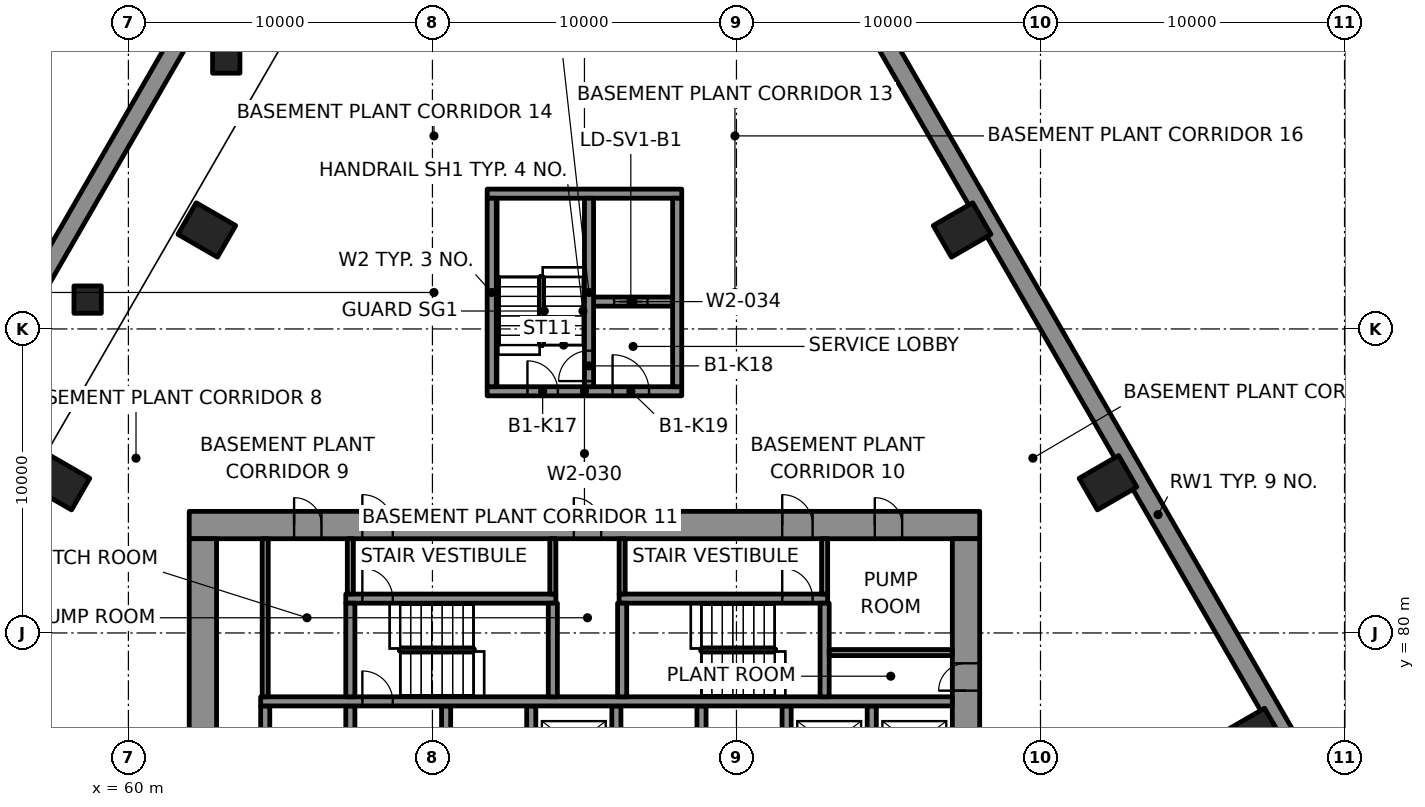
"""IFC4 building model, lengths in metres.
Left out: names, types, materials, properties, quantities, classifications, styles, units other than length and angle.
Written with IfcOpenShell. Run it as: python <this file> out.ifc"""

import sys

from ifc_helpers import new_model, si_unit, direction, frame, frame_2d, origin, origin_2d, place, context, subcontext, project, spatial, rectangle, extrude, element, fill, save


model = new_model("IFC4")
c1 = context("Model", 3, precision=1e-05, world=origin(), true_north=direction((0.0, 1.0)))
c2 = subcontext(c1, "Body", "Model", "MODEL_VIEW")
j1 = project(units=[si_unit("LENGTHUNIT", "METRE"), si_unit("PLANEANGLEUNIT", "RADIAN")], contexts=[c1])
p1 = place(None, origin())
s1 = spatial("IfcSite", under=j1, at=p1, CompositionType="ELEMENT")
p2 = place(p1, origin())
s2 = spatial("IfcBuilding", under=s1, at=p2, CompositionType="ELEMENT")
p3 = place(p2, frame((0.0, 0.0, -5.0)))
s3 = spatial("IfcBuildingStorey", under=s2, at=p3, CompositionType="ELEMENT", Elevation=-5.0)
p4 = place(p3, frame((109.132, 57.451, -0.35), z_axis=(0.0, 0.0, 1.0), x_axis=(-0.499999206999, 0.866025861623, 0.0)))
e1 = element("IfcWall", 1, at=p4, inside=s3, PredefinedType="SOLIDWALL", context=c2, shape_type="SweptSolid", body=[
    extrude(rectangle(XDim=61.064, YDim=0.6, at=frame_2d((30.532, 0.0))), origin(), (0.0, 0.0, 1.0), 5.05),
])
p5 = place(p3, frame((67.936, 110.334, -0.35), z_axis=(0.0, 0.0, 1.0), x_axis=(-0.499999089162, -0.866025929656, 0.0)))
e2 = element("IfcWall", 2, at=p5, inside=s3, PredefinedType="SOLIDWALL", context=c2, shape_type="SweptSolid", body=[
    extrude(rectangle(XDim=53.501, YDim=0.6, at=frame_2d((26.751, 0.0))), origin(), (0.0, 0.0, 1.0), 5.05),
])
for number, where, z_axis, x_axis in (
    (3, (97.021, 76.628, 0.0), (0.0, 0.0, 1.0), (-0.5, 0.866, 0.0)),
    (4, (92.22, 84.942, 0.0), (0.0, 0.0, 1.0), (-0.5, 0.866, 0.0)),
    (5, (87.421, 93.256, 0.0), (0.0, 0.0, 1.0), (-0.5, 0.866, 0.0)),
    (6, (62.579, 93.256, 0.0), (0.0, 0.0, 1.0), (-0.5, -0.866, 0.0)),
    (7, (57.78, 84.942, 0.0), (0.0, 0.0, 1.0), (-0.5, -0.866, 0.0)),
):
    element("IfcColumn", number, at=place(p3, frame(where, z_axis=z_axis, x_axis=x_axis)), inside=s3, PredefinedType="COLUMN", context=c2, shape_type="SweptSolid", body=[
        extrude(rectangle(XDim=1.2, YDim=1.5, at=origin_2d()), origin(), (0.0, 0.0, 1.0), 5.0),
    ])
for number, where, z_axis, x_axis in (
    (8, (58.659, 90.966, 0.0), (0.0, 0.0, 1.0), (1.0, 0.0, 0.0)),
    (9, (63.219, 98.863, 0.0), (0.0, 0.0, 1.0), (1.0, 0.0, 0.0)),
):
    element("IfcColumn", number, at=place(p3, frame(where, z_axis=z_axis, x_axis=x_axis)), inside=s3, PredefinedType="COLUMN", context=c2, shape_type="SweptSolid", body=[
        extrude(rectangle(XDim=0.9, YDim=0.9, at=origin_2d()), origin(), (0.0, 0.0, 1.0), 4.55),
    ])
p6 = place(p3, frame((62.0, 83.55, 0.0), z_axis=(0.0, 0.0, 1.0), x_axis=(1.0, 0.0, 0.0)))
e10 = element("IfcWall", 10, at=p6, inside=s3, PredefinedType="SHEAR", context=c2, shape_type="SweptSolid", body=[
    extrude(rectangle(XDim=26.0, YDim=0.9, at=frame_2d((13.0, 0.0))), origin(), (0.0, 0.0, 1.0), 4.7),
])
p7 = place(p6, frame((5.695, 0.0, 0.0)))
e11 = element("IfcOpeningElement", 11, at=p7, cuts=e10, PredefinedType="OPENING", context=c2, shape_type="SweptSolid", body=[
    extrude(rectangle(XDim=1.0, YDim=2.1, at=frame_2d((0.5, 1.05))), frame((0.0, 0.46, 0.0), z_axis=(0.0, -1.0, 0.0), x_axis=(1.0, 0.0, 0.0)), (0.0, 0.0, 1.0), 0.92),
])
p8 = place(p6, frame((19.505, 0.0, 0.0)))
e12 = element("IfcOpeningElement", 12, at=p8, cuts=e10, PredefinedType="OPENING", context=c2, shape_type="SweptSolid", body=[
    extrude(rectangle(XDim=1.0, YDim=2.1, at=frame_2d((0.5, 1.05))), frame((0.0, 0.46, 0.0), z_axis=(0.0, -1.0, 0.0), x_axis=(1.0, 0.0, 0.0)), (0.0, 0.0, 1.0), 0.92),
])
p9 = place(p6, frame((3.45, 0.0, 0.0)))
e13 = element("IfcOpeningElement", 13, at=p9, cuts=e10, PredefinedType="OPENING", context=c2, shape_type="SweptSolid", body=[
    extrude(rectangle(XDim=0.9, YDim=2.1, at=frame_2d((0.45, 1.05))), frame((0.0, 0.46, 0.0), z_axis=(0.0, -1.0, 0.0), x_axis=(1.0, 0.0, 0.0)), (0.0, 0.0, 1.0), 0.92),
])
p10 = place(p6, frame((12.65, 0.0, 0.0)))
e14 = element("IfcOpeningElement", 14, at=p10, cuts=e10, PredefinedType="OPENING", context=c2, shape_type="SweptSolid", body=[
    extrude(rectangle(XDim=0.9, YDim=2.1, at=frame_2d((0.45, 1.05))), frame((0.0, 0.46, 0.0), z_axis=(0.0, -1.0, 0.0), x_axis=(1.0, 0.0, 0.0)), (0.0, 0.0, 1.0), 0.92),
])
p11 = place(p6, frame((22.55, 0.0, 0.0)))
e15 = element("IfcOpeningElement", 15, at=p11, cuts=e10, PredefinedType="OPENING", context=c2, shape_type="SweptSolid", body=[
    extrude(rectangle(XDim=0.9, YDim=2.1, at=frame_2d((0.45, 1.05))), frame((0.0, 0.46, 0.0), z_axis=(0.0, -1.0, 0.0), x_axis=(1.0, 0.0, 0.0)), (0.0, 0.0, 1.0), 0.92),
])
p12 = place(p3, frame((62.45, 66.9, 0.0), z_axis=(0.0, 0.0, 1.0), x_axis=(0.0, 1.0, 0.0)))
e16 = element("IfcWall", 16, at=p12, inside=s3, PredefinedType="SHEAR", context=c2, shape_type="SweptSolid", body=[
    extrude(rectangle(XDim=16.2, YDim=0.9, at=frame_2d((8.1, 0.0))), origin(), (0.0, 0.0, 1.0), 4.7),
])
p13 = place(p12, frame((5.5, 0.0, 0.0)))
e17 = element("IfcOpeningElement", 17, at=p13, cuts=e16, PredefinedType="OPENING", context=c2, shape_type="SweptSolid", body=[
    extrude(rectangle(XDim=1.8, YDim=2.1, at=frame_2d((0.9, 1.05))), frame((0.0, 0.46, 0.0), z_axis=(0.0, -1.0, 0.0), x_axis=(1.0, 0.0, 0.0)), (0.0, 0.0, 1.0), 0.92),
])
p14 = place(p3, frame((87.55, 66.9, 0.0), z_axis=(0.0, 0.0, 1.0), x_axis=(0.0, 1.0, 0.0)))
e18 = element("IfcWall", 18, at=p14, inside=s3, PredefinedType="SHEAR", context=c2, shape_type="SweptSolid", body=[
    extrude(rectangle(XDim=16.2, YDim=0.9, at=frame_2d((8.1, 0.0))), origin(), (0.0, 0.0, 1.0), 4.7),
])
p15 = place(p14, frame((5.5, 0.0, 0.0)))
e19 = element("IfcOpeningElement", 19, at=p15, cuts=e18, PredefinedType="OPENING", context=c2, shape_type="SweptSolid", body=[
    extrude(rectangle(XDim=1.8, YDim=2.1, at=frame_2d((0.9, 1.05))), frame((0.0, 0.46, 0.0), z_axis=(0.0, -1.0, 0.0), x_axis=(1.0, 0.0, 0.0)), (0.0, 0.0, 1.0), 0.92),
])
p16 = place(p14, frame((11.202, 0.0, 0.0)))
e20 = element("IfcOpeningElement", 20, at=p16, cuts=e18, PredefinedType="OPENING", context=c2, shape_type="SweptSolid", body=[
    extrude(rectangle(XDim=0.9, YDim=2.1, at=frame_2d((0.45, 1.05))), frame((0.0, 0.46, 0.0), z_axis=(0.0, -1.0, 0.0), x_axis=(1.0, 0.0, 0.0)), (0.0, 0.0, 1.0), 0.92),
])
for number, where, z_axis, x_axis in (
    (21, (64.5, 75.0, 0.0), (0.0, 0.0, 1.0), (0.0, 1.0, 0.0)),
    (22, (67.3, 75.0, 0.0), (0.0, 0.0, 1.0), (0.0, 1.0, 0.0)),
):
    element("IfcWall", number, at=place(p3, frame(where, z_axis=z_axis, x_axis=x_axis)), inside=s3, PredefinedType="SHEAR", context=c2, shape_type="SweptSolid", body=[
        extrude(rectangle(XDim=2.6, YDim=0.3, at=frame_2d((1.3, 0.0))), origin(), (0.0, 0.0, 1.0), 4.7),
    ])
p17 = place(p3, frame((70.45, 75.0, 0.0), z_axis=(0.0, 0.0, 1.0), x_axis=(0.0, 1.0, 0.0)))
e23 = element("IfcWall", 23, at=p17, inside=s3, PredefinedType="SHEAR", context=c2, shape_type="SweptSolid", body=[
    extrude(rectangle(XDim=2.6, YDim=0.3, at=frame_2d((1.3, 0.0))), origin(), (0.0, 0.0, 1.0), 4.7),
])
p18 = place(p17, frame((0.15, 0.0, 0.0)))
e24 = element("IfcOpeningElement", 24, at=p18, cuts=e23, PredefinedType="OPENING", context=c2, shape_type="SweptSolid", body=[
    extrude(rectangle(XDim=1.1, YDim=2.1, at=frame_2d((0.55, 1.05))), frame((0.0, 0.16, 0.0), z_axis=(0.0, -1.0, 0.0), x_axis=(1.0, 0.0, 0.0)), (0.0, 0.0, 1.0), 0.32),
])
for number, where, z_axis, x_axis in (
    (25, (73.25, 75.0, 0.0), (0.0, 0.0, 1.0), (0.0, 1.0, 0.0)),
    (26, (76.05, 75.0, 0.0), (0.0, 0.0, 1.0), (0.0, 1.0, 0.0)),
    (27, (78.85, 75.0, 0.0), (0.0, 0.0, 1.0), (0.0, 1.0, 0.0)),
    (28, (81.65, 75.0, 0.0), (0.0, 0.0, 1.0), (0.0, 1.0, 0.0)),
    (29, (84.45, 75.0, 0.0), (0.0, 0.0, 1.0), (0.0, 1.0, 0.0)),
):
    element("IfcWall", number, at=place(p3, frame(where, z_axis=z_axis, x_axis=x_axis)), inside=s3, PredefinedType="SHEAR", context=c2, shape_type="SweptSolid", body=[
        extrude(rectangle(XDim=2.6, YDim=0.3, at=frame_2d((1.3, 0.0))), origin(), (0.0, 0.0, 1.0), 4.7),
    ])
p19 = place(p3, frame((64.35, 77.75, 0.0), z_axis=(0.0, 0.0, 1.0), x_axis=(1.0, 0.0, 0.0)))
e30 = element("IfcWall", 30, at=p19, inside=s3, PredefinedType="SHEAR", context=c2, shape_type="SweptSolid", body=[
    extrude(rectangle(XDim=22.75, YDim=0.3, at=frame_2d((11.375, 0.0))), origin(), (0.0, 0.0, 1.0), 4.7),
])
p20 = place(p19, frame((3.345, 0.0, 0.0)))
e31 = element("IfcOpeningElement", 31, at=p20, cuts=e30, PredefinedType="OPENING", context=c2, shape_type="SweptSolid", body=[
    extrude(rectangle(XDim=1.0, YDim=2.1, at=frame_2d((0.5, 1.05))), frame((0.0, 0.16, 0.0), z_axis=(0.0, -1.0, 0.0), x_axis=(1.0, 0.0, 0.0)), (0.0, 0.0, 1.0), 0.32),
])
p21 = place(p3, frame((67.15, 81.13, 0.0), z_axis=(0.0, 0.0, 1.0), x_axis=(1.0, 0.0, 0.0)))
e32 = element("IfcWall", 32, at=p21, inside=s3, PredefinedType="SHEAR", context=c2, shape_type="SweptSolid", body=[
    extrude(rectangle(XDim=6.91, YDim=0.3, at=frame_2d((3.455, 0.0))), origin(), (0.0, 0.0, 1.0), 4.7),
])
p22 = place(p21, frame((0.545, 0.0, 0.0)))
e33 = element("IfcOpeningElement", 33, at=p22, cuts=e32, PredefinedType="OPENING", context=c2, shape_type="SweptSolid", body=[
    extrude(rectangle(XDim=1.0, YDim=2.1, at=frame_2d((0.5, 1.05))), frame((0.0, 0.16, 0.0), z_axis=(0.0, -1.0, 0.0), x_axis=(1.0, 0.0, 0.0)), (0.0, 0.0, 1.0), 0.32),
])
p23 = place(p3, frame((76.14, 81.13, 0.0), z_axis=(0.0, 0.0, 1.0), x_axis=(1.0, 0.0, 0.0)))
e34 = element("IfcWall", 34, at=p23, inside=s3, PredefinedType="SHEAR", context=c2, shape_type="SweptSolid", body=[
    extrude(rectangle(XDim=6.86, YDim=0.3, at=frame_2d((3.43, 0.0))), origin(), (0.0, 0.0, 1.0), 4.7),
])
p24 = place(p23, frame((5.365, 0.0, 0.0)))
e35 = element("IfcOpeningElement", 35, at=p24, cuts=e34, PredefinedType="OPENING", context=c2, shape_type="SweptSolid", body=[
    extrude(rectangle(XDim=1.0, YDim=2.1, at=frame_2d((0.5, 1.05))), frame((0.0, 0.16, 0.0), z_axis=(0.0, -1.0, 0.0), x_axis=(1.0, 0.0, 0.0)), (0.0, 0.0, 1.0), 0.32),
])
for number, where, z_axis, x_axis in (
    (36, (67.3, 77.9, 0.0), (0.0, 0.0, 1.0), (0.0, 1.0, 0.0)),
    (37, (73.96, 77.9, 0.0), (0.0, 0.0, 1.0), (0.0, 1.0, 0.0)),
    (38, (76.24, 77.9, 0.0), (0.0, 0.0, 1.0), (0.0, 1.0, 0.0)),
    (39, (82.9, 77.9, 0.0), (0.0, 0.0, 1.0), (0.0, 1.0, 0.0)),
):
    element("IfcWall", number, at=place(p3, frame(where, z_axis=z_axis, x_axis=x_axis)), inside=s3, PredefinedType="SHEAR", context=c2, shape_type="SweptSolid", body=[
        extrude(rectangle(XDim=3.08, YDim=0.3, at=frame_2d((1.54, 0.0))), origin(), (0.0, 0.0, 1.0), 4.7),
    ])
p25 = place(p3, frame((71.8, 87.95, 0.0), z_axis=(0.0, 0.0, 1.0), x_axis=(1.0, 0.0, 0.0)))
e40 = element("IfcWall", 40, at=p25, inside=s3, PredefinedType="SHEAR", context=c2, shape_type="SweptSolid", body=[
    extrude(rectangle(XDim=6.4, YDim=0.3, at=frame_2d((3.2, 0.0))), origin(), (0.0, 0.0, 1.0), 4.7),
])
p26 = place(p25, frame((1.325, 0.0, 0.0)))
e41 = element("IfcOpeningElement", 41, at=p26, cuts=e40, PredefinedType="OPENING", context=c2, shape_type="SweptSolid", body=[
    extrude(rectangle(XDim=1.0, YDim=2.1, at=frame_2d((0.5, 1.05))), frame((0.0, 0.16, 0.0), z_axis=(0.0, -1.0, 0.0), x_axis=(1.0, 0.0, 0.0)), (0.0, 0.0, 1.0), 0.32),
])
p27 = place(p25, frame((4.125, 0.0, 0.0)))
e42 = element("IfcOpeningElement", 42, at=p27, cuts=e40, PredefinedType="OPENING", context=c2, shape_type="SweptSolid", body=[
    extrude(rectangle(XDim=1.2, YDim=2.1, at=frame_2d((0.6, 1.05))), frame((0.0, 0.16, 0.0), z_axis=(0.0, -1.0, 0.0), x_axis=(1.0, 0.0, 0.0)), (0.0, 0.0, 1.0), 0.32),
])
p28 = place(p3, frame((71.8, 94.45, 0.0), z_axis=(0.0, 0.0, 1.0), x_axis=(1.0, 0.0, 0.0)))
e43 = element("IfcWall", 43, at=p28, inside=s3, PredefinedType="SHEAR", context=c2, shape_type="SweptSolid", body=[
    extrude(rectangle(XDim=6.4, YDim=0.3, at=frame_2d((3.2, 0.0))), origin(), (0.0, 0.0, 1.0), 4.7),
])
for number, where, z_axis, x_axis in (
    (44, (71.95, 88.1, 0.0), (0.0, 0.0, 1.0), (0.0, 1.0, 0.0)),
    (45, (78.05, 88.1, 0.0), (0.0, 0.0, 1.0), (0.0, 1.0, 0.0)),
):
    element("IfcWall", number, at=place(p3, frame(where, z_axis=z_axis, x_axis=x_axis)), inside=s3, PredefinedType="SHEAR", context=c2, shape_type="SweptSolid", body=[
        extrude(rectangle(XDim=6.2, YDim=0.3, at=frame_2d((3.1, 0.0))), origin(), (0.0, 0.0, 1.0), 4.7),
    ])
p29 = place(p3, frame((75.3, 90.9, 0.0), z_axis=(0.0, 0.0, 1.0), x_axis=(1.0, 0.0, 0.0)))
e46 = element("IfcWall", 46, at=p29, inside=s3, PredefinedType="SHEAR", context=c2, shape_type="SweptSolid", body=[
    extrude(rectangle(XDim=2.6, YDim=0.3, at=frame_2d((1.3, 0.0))), origin(), (0.0, 0.0, 1.0), 4.7),
])
p30 = place(p29, frame((0.675, 0.0, 0.0)))
e47 = element("IfcOpeningElement", 47, at=p30, cuts=e46, PredefinedType="OPENING", context=c2, shape_type="SweptSolid", body=[
    extrude(rectangle(XDim=1.1, YDim=2.1, at=frame_2d((0.55, 1.05))), frame((0.0, 0.16, 0.0), z_axis=(0.0, -1.0, 0.0), x_axis=(1.0, 0.0, 0.0)), (0.0, 0.0, 1.0), 0.32),
])
p31 = place(p3, frame((75.15, 88.1, 0.0), z_axis=(0.0, 0.0, 1.0), x_axis=(0.0, 1.0, 0.0)))
e48 = element("IfcWall", 48, at=p31, inside=s3, PredefinedType="SHEAR", context=c2, shape_type="SweptSolid", body=[
    extrude(rectangle(XDim=6.2, YDim=0.3, at=frame_2d((3.1, 0.0))), origin(), (0.0, 0.0, 1.0), 4.7),
])
p32 = place(p31, frame((0.185, 0.0, 0.0)))
e49 = element("IfcOpeningElement", 49, at=p32, cuts=e48, PredefinedType="OPENING", context=c2, shape_type="SweptSolid", body=[
    extrude(rectangle(XDim=1.0, YDim=2.1, at=frame_2d((0.5, 1.05))), frame((0.0, 0.16, 0.0), z_axis=(0.0, -1.0, 0.0), x_axis=(1.0, 0.0, 0.0)), (0.0, 0.0, 1.0), 0.32),
])
p33 = place(p3, frame((83.05, 79.355, 0.0), z_axis=(0.0, 0.0, 1.0), x_axis=(1.0, 0.0, 0.0)))
e50 = element("IfcWall", 50, at=p33, inside=s3, PredefinedType="PARTITIONING", context=c2, shape_type="SweptSolid", body=[
    extrude(rectangle(XDim=4.05, YDim=0.2, at=frame_2d((2.025, 0.0))), origin(), (0.0, 0.0, 1.0), 4.7),
])
p34 = place(p3, frame((64.5, 77.9, 0.0), z_axis=(0.0, 0.0, 1.0), x_axis=(0.0, 1.0, 0.0)))
e51 = element("IfcWall", 51, at=p34, inside=s3, PredefinedType="PARTITIONING", context=c2, shape_type="SweptSolid", body=[
    extrude(rectangle(XDim=5.2, YDim=0.2, at=frame_2d((2.6, 0.0))), origin(), (0.0, 0.0, 1.0), 4.7),
])
for number, where, z_axis, x_axis in (
    (52, (67.3, 81.28, 0.0), (0.0, 0.0, 1.0), (0.0, 1.0, 0.0)),
    (53, (73.96, 81.28, 0.0), (0.0, 0.0, 1.0), (0.0, 1.0, 0.0)),
    (54, (76.24, 81.28, 0.0), (0.0, 0.0, 1.0), (0.0, 1.0, 0.0)),
    (55, (82.9, 81.28, 0.0), (0.0, 0.0, 1.0), (0.0, 1.0, 0.0)),
):
    element("IfcWall", number, at=place(p3, frame(where, z_axis=z_axis, x_axis=x_axis)), inside=s3, PredefinedType="PARTITIONING", context=c2, shape_type="SweptSolid", body=[
        extrude(rectangle(XDim=1.82, YDim=0.2, at=frame_2d((0.91, 0.0))), origin(), (0.0, 0.0, 1.0), 4.7),
    ])
p35 = place(p30, origin())
e56 = element("IfcDoor", 56, at=p35, inside=s3, OperationType="DOUBLE_DOOR_SLIDING", PredefinedType="DOOR", context=c2, shape_type="SweptSolid", body=[
    extrude(rectangle(XDim=1.1, YDim=2.1, at=frame_2d((0.55, 1.05))), frame((0.0, 0.025, 0.0), z_axis=(0.0, -1.0, 0.0), x_axis=(1.0, 0.0, 0.0)), (0.0, 0.0, 1.0), 0.05),
])
fill(e47, e56)
p36 = place(p20, origin())
e57 = element("IfcDoor", 57, at=p36, inside=s3, OperationType="SINGLE_SWING_LEFT", PredefinedType="DOOR", context=c2, shape_type="SweptSolid", body=[
    extrude(rectangle(XDim=1.0, YDim=2.1, at=frame_2d((0.5, 1.05))), frame((0.0, 0.025, 0.0), z_axis=(0.0, -1.0, 0.0), x_axis=(1.0, 0.0, 0.0)), (0.0, 0.0, 1.0), 0.05),
])
fill(e31, e57)
p37 = place(p22, origin())
e58 = element("IfcDoor", 58, at=p37, inside=s3, OperationType="SINGLE_SWING_RIGHT", PredefinedType="DOOR", context=c2, shape_type="SweptSolid", body=[
    extrude(rectangle(XDim=1.0, YDim=2.1, at=frame_2d((0.5, 1.05))), frame((0.0, 0.025, 0.0), z_axis=(0.0, -1.0, 0.0), x_axis=(1.0, 0.0, 0.0)), (0.0, 0.0, 1.0), 0.05),
])
fill(e33, e58)
p38 = place(p7, origin())
e59 = element("IfcDoor", 59, at=p38, inside=s3, OperationType="SINGLE_SWING_LEFT", PredefinedType="DOOR", context=c2, shape_type="SweptSolid", body=[
    extrude(rectangle(XDim=1.0, YDim=2.1, at=frame_2d((0.5, 1.05))), frame((0.0, 0.17, 0.0), z_axis=(0.0, -1.0, 0.0), x_axis=(1.0, 0.0, 0.0)), (0.0, 0.0, 1.0), 0.34),
])
fill(e11, e59)
p39 = place(p24, origin())
e60 = element("IfcDoor", 60, at=p39, inside=s3, OperationType="SINGLE_SWING_RIGHT", PredefinedType="DOOR", context=c2, shape_type="SweptSolid", body=[
    extrude(rectangle(XDim=1.0, YDim=2.1, at=frame_2d((0.5, 1.05))), frame((0.0, 0.025, 0.0), z_axis=(0.0, -1.0, 0.0), x_axis=(1.0, 0.0, 0.0)), (0.0, 0.0, 1.0), 0.05),
])
fill(e35, e60)
p40 = place(p8, origin())
e61 = element("IfcDoor", 61, at=p40, inside=s3, OperationType="SINGLE_SWING_LEFT", PredefinedType="DOOR", context=c2, shape_type="SweptSolid", body=[
    extrude(rectangle(XDim=1.0, YDim=2.1, at=frame_2d((0.5, 1.05))), frame((0.0, 0.17, 0.0), z_axis=(0.0, -1.0, 0.0), x_axis=(1.0, 0.0, 0.0)), (0.0, 0.0, 1.0), 0.34),
])
fill(e12, e61)
p41 = place(p26, origin())
e62 = element("IfcDoor", 62, at=p41, inside=s3, OperationType="SINGLE_SWING_RIGHT", PredefinedType="DOOR", context=c2, shape_type="SweptSolid", body=[
    extrude(rectangle(XDim=1.0, YDim=2.1, at=frame_2d((0.5, 1.05))), frame((0.0, 0.025, 0.0), z_axis=(0.0, -1.0, 0.0), x_axis=(1.0, 0.0, 0.0)), (0.0, 0.0, 1.0), 0.05),
])
fill(e41, e62)
p42 = place(p32, origin())
e63 = element("IfcDoor", 63, at=p42, inside=s3, OperationType="SINGLE_SWING_LEFT", PredefinedType="DOOR", context=c2, shape_type="SweptSolid", body=[
    extrude(rectangle(XDim=1.0, YDim=2.1, at=frame_2d((0.5, 1.05))), frame((0.0, 0.025, 0.0), z_axis=(0.0, -1.0, 0.0), x_axis=(1.0, 0.0, 0.0)), (0.0, 0.0, 1.0), 0.05),
])
fill(e49, e63)
p43 = place(p27, origin())
e64 = element("IfcDoor", 64, at=p43, inside=s3, OperationType="SINGLE_SWING_RIGHT", PredefinedType="DOOR", context=c2, shape_type="SweptSolid", body=[
    extrude(rectangle(XDim=1.2, YDim=2.1, at=frame_2d((0.6, 1.05))), frame((0.0, 0.025, 0.0), z_axis=(0.0, -1.0, 0.0), x_axis=(1.0, 0.0, 0.0)), (0.0, 0.0, 1.0), 0.05),
])
fill(e42, e64)
p44 = place(p9, origin())
e65 = element("IfcDoor", 65, at=p44, inside=s3, OperationType="SINGLE_SWING_RIGHT", PredefinedType="DOOR", context=c2, shape_type="SweptSolid", body=[
    extrude(rectangle(XDim=0.9, YDim=2.1, at=frame_2d((0.45, 1.05))), frame((0.0, 0.17, 0.0), z_axis=(0.0, -1.0, 0.0), x_axis=(1.0, 0.0, 0.0)), (0.0, 0.0, 1.0), 0.34),
])
fill(e13, e65)
p45 = place(p10, origin())
e66 = element("IfcDoor", 66, at=p45, inside=s3, OperationType="SINGLE_SWING_LEFT", PredefinedType="DOOR", context=c2, shape_type="SweptSolid", body=[
    extrude(rectangle(XDim=0.9, YDim=2.1, at=frame_2d((0.45, 1.05))), frame((0.0, 0.17, 0.0), z_axis=(0.0, -1.0, 0.0), x_axis=(1.0, 0.0, 0.0)), (0.0, 0.0, 1.0), 0.34),
])
fill(e14, e66)
p46 = place(p16, origin())
e67 = element("IfcDoor", 67, at=p46, inside=s3, OperationType="SINGLE_SWING_RIGHT", PredefinedType="DOOR", context=c2, shape_type="SweptSolid", body=[
    extrude(rectangle(XDim=0.9, YDim=2.1, at=frame_2d((0.45, 1.05))), frame((0.0, 0.17, 0.0), z_axis=(0.0, -1.0, 0.0), x_axis=(1.0, 0.0, 0.0)), (0.0, 0.0, 1.0), 0.34),
])
fill(e20, e67)
p47 = place(p11, origin())
e68 = element("IfcDoor", 68, at=p47, inside=s3, OperationType="SINGLE_SWING_LEFT", PredefinedType="DOOR", context=c2, shape_type="SweptSolid", body=[
    extrude(rectangle(XDim=0.9, YDim=2.1, at=frame_2d((0.45, 1.05))), frame((0.0, 0.17, 0.0), z_axis=(0.0, -1.0, 0.0), x_axis=(1.0, 0.0, 0.0)), (0.0, 0.0, 1.0), 0.34),
])
fill(e15, e68)
save(model, sys.argv[1])
